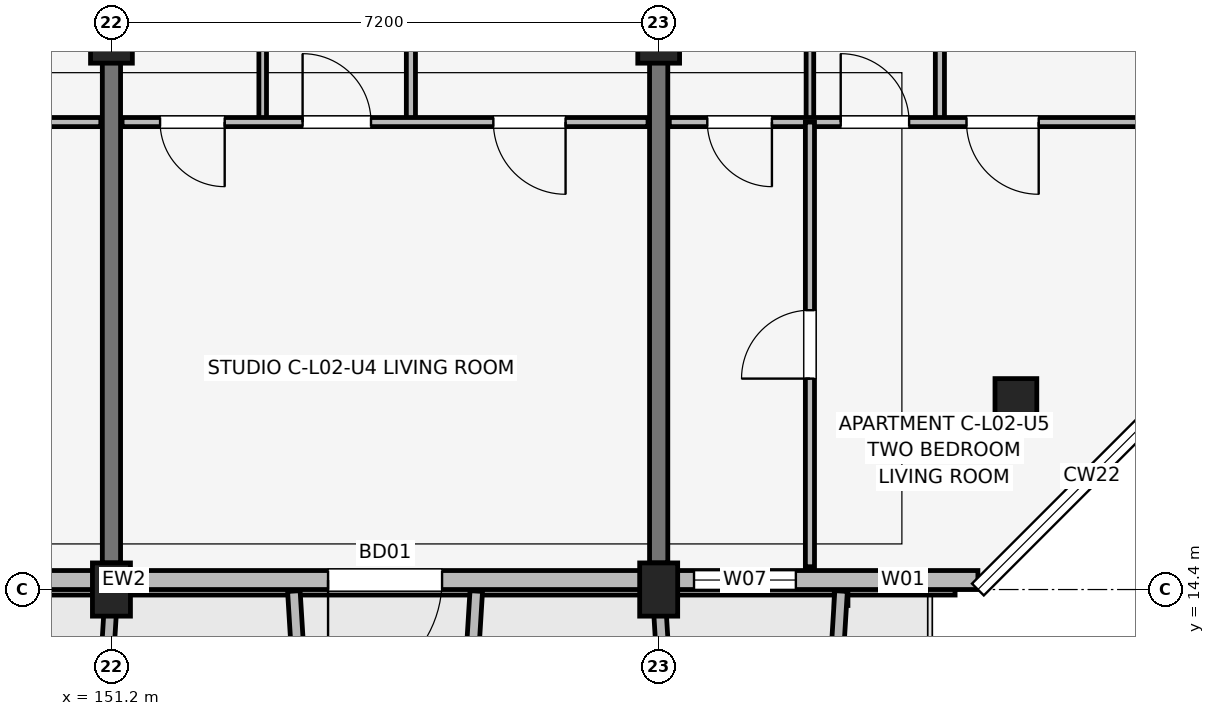
"""IFC4 building model, lengths in metres.
Left out: names, types, materials, properties, quantities, classifications, styles, units other than length and angle.
Written with IfcOpenShell. Run it as: python <this file> out.ifc"""

import sys

from ifc_helpers import new_model, si_unit, direction, frame, frame_2d, origin, origin_2d, place, context, subcontext, project, spatial, rectangle, extrude, element, fill, save


model = new_model("IFC4")
c1 = context("Model", 3, precision=1e-05, world=origin(), true_north=direction((0.0, 1.0)))
c2 = subcontext(c1, "Body", "Model", "MODEL_VIEW")
j1 = project(units=[si_unit("LENGTHUNIT", "METRE"), si_unit("PLANEANGLEUNIT", "RADIAN")], contexts=[c1])
p1 = place(None, origin())
s1 = spatial("IfcSite", under=j1, at=p1, CompositionType="ELEMENT")
p2 = place(p1, origin())
s2 = spatial("IfcBuilding", under=s1, at=p2, CompositionType="ELEMENT")
p3 = place(p2, frame((0.0, 0.0, 8.7)))
s3 = spatial("IfcBuildingStorey", under=s2, at=p3, CompositionType="ELEMENT", Elevation=8.7)
p4 = place(p3, frame((151.2, 14.4, 0.0), z_axis=(0.0, 0.0, 1.0), x_axis=(1.0, 0.0, 0.0)))
e1 = element("IfcColumn", 1, at=p4, inside=s3, PredefinedType="COLUMN", context=c2, shape_type="SweptSolid", body=[
    extrude(rectangle(XDim=0.5, YDim=0.7, at=origin_2d()), origin(), (0.0, 0.0, 1.0), 3.15),
])
p5 = place(p3, frame((151.2, 21.6, 0.0), z_axis=(0.0, 0.0, 1.0), x_axis=(1.0, 0.0, 0.0)))
e2 = element("IfcColumn", 2, at=p5, inside=s3, PredefinedType="COLUMN", context=c2, shape_type="SweptSolid", body=[
    extrude(rectangle(XDim=0.55, YDim=0.55, at=origin_2d()), origin(), (0.0, 0.0, 1.0), 3.15),
])
p6 = place(p3, frame((158.4, 14.4, 0.0), z_axis=(0.0, 0.0, 1.0), x_axis=(1.0, 0.0, 0.0)))
e3 = element("IfcColumn", 3, at=p6, inside=s3, PredefinedType="COLUMN", context=c2, shape_type="SweptSolid", body=[
    extrude(rectangle(XDim=0.5, YDim=0.7, at=origin_2d()), origin(), (0.0, 0.0, 1.0), 3.15),
])
for number, where, z_axis, x_axis in (
    (4, (158.4, 21.6, 0.0), (0.0, 0.0, 1.0), (1.0, 0.0, 0.0)),
    (5, (163.1, 16.9, 0.0), (0.0, 0.0, 1.0), (1.0, 0.0, 0.0)),
):
    element("IfcColumn", number, at=place(p3, frame(where, z_axis=z_axis, x_axis=x_axis)), inside=s3, PredefinedType="COLUMN", context=c2, shape_type="SweptSolid", body=[
        extrude(rectangle(XDim=0.55, YDim=0.55, at=origin_2d()), origin(), (0.0, 0.0, 1.0), 3.15),
    ])
for number, where, z_axis, x_axis in (
    (6, (151.2, 14.75, 0.0), (0.0, 0.0, 1.0), (0.0, 1.0, 0.0)),
    (7, (158.4, 14.75, 0.0), (0.0, 0.0, 1.0), (0.0, 1.0, 0.0)),
):
    element("IfcWall", number, at=place(p3, frame(where, z_axis=z_axis, x_axis=x_axis)), inside=s3, PredefinedType="SHEAR", context=c2, shape_type="SweptSolid", body=[
        extrude(rectangle(XDim=9.4, YDim=0.24, at=frame_2d((4.7, 0.0))), origin(), (0.0, 0.0, 1.0), 3.15),
    ])
p7 = place(p3, frame((132.6, 14.525, 0.0), z_axis=(0.0, 0.0, 1.0), x_axis=(1.0, 0.0, 0.0)))
e8 = element("IfcWall", 8, at=p7, inside=s3, PredefinedType="SOLIDWALL", context=c2, shape_type="SweptSolid", body=[
    extrude(rectangle(XDim=30.0, YDim=0.25, at=frame_2d((15.0, 0.0))), origin(), (0.0, 0.0, 1.0), 2.43),
])
p8 = place(p7, frame((8.625, 0.0, 0.0), z_axis=(0.0, 0.0, 1.0), x_axis=(-1.0, 0.0, 0.0)))
e9 = element("IfcOpeningElement", 9, at=p8, cuts=e8, PredefinedType="OPENING", context=c2, shape_type="SweptSolid", body=[
    extrude(rectangle(XDim=1.65, YDim=2.15, at=frame_2d((0.825, 1.075))), frame((0.0, 0.135, 0.0), z_axis=(0.0, -1.0, 0.0), x_axis=(1.0, 0.0, 0.0)), (0.0, 0.0, 1.0), 0.27),
])
p9 = place(p7, frame((22.95, 0.0, 0.0), z_axis=(0.0, 0.0, 1.0), x_axis=(-1.0, 0.0, 0.0)))
e10 = element("IfcOpeningElement", 10, at=p9, cuts=e8, PredefinedType="OPENING", context=c2, shape_type="SweptSolid", body=[
    extrude(rectangle(XDim=1.5, YDim=2.15, at=frame_2d((0.75, 1.075))), frame((0.0, 0.135, 0.0), z_axis=(0.0, -1.0, 0.0), x_axis=(1.0, 0.0, 0.0)), (0.0, 0.0, 1.0), 0.27),
])
p10 = place(p7, frame((1.925, 0.0, 0.7)))
e11 = element("IfcOpeningElement", 11, at=p10, cuts=e8, PredefinedType="OPENING", context=c2, shape_type="SweptSolid", body=[
    extrude(rectangle(XDim=1.86, YDim=1.6, at=frame_2d((0.93, 0.8))), frame((0.0, 0.135, 0.0), z_axis=(0.0, -1.0, 0.0), x_axis=(1.0, 0.0, 0.0)), (0.0, 0.0, 1.0), 0.27),
])
p11 = place(p7, frame((4.85, 0.0, 0.75)))
e12 = element("IfcOpeningElement", 12, at=p11, cuts=e8, PredefinedType="OPENING", context=c2, shape_type="SweptSolid", body=[
    extrude(rectangle(XDim=1.22, YDim=1.5, at=frame_2d((0.61, 0.75))), frame((0.0, 0.135, 0.0), z_axis=(0.0, -1.0, 0.0), x_axis=(1.0, 0.0, 0.0)), (0.0, 0.0, 1.0), 0.27),
])
p12 = place(p7, frame((13.925, 0.0, 0.67)))
e13 = element("IfcOpeningElement", 13, at=p12, cuts=e8, PredefinedType="OPENING", context=c2, shape_type="SweptSolid", body=[
    extrude(rectangle(XDim=2.15, YDim=1.65, at=frame_2d((1.075, 0.825))), frame((0.0, 0.135, 0.0), z_axis=(0.0, -1.0, 0.0), x_axis=(1.0, 0.0, 0.0)), (0.0, 0.0, 1.0), 0.27),
])
p13 = place(p7, frame((26.265, 0.0, 0.75)))
e14 = element("IfcOpeningElement", 14, at=p13, cuts=e8, PredefinedType="OPENING", context=c2, shape_type="SweptSolid", body=[
    extrude(rectangle(XDim=1.34, YDim=1.55, at=frame_2d((0.67, 0.775))), frame((0.0, 0.135, 0.0), z_axis=(0.0, -1.0, 0.0), x_axis=(1.0, 0.0, 0.0)), (0.0, 0.0, 1.0), 0.27),
])
p14 = place(p7, frame((28.715, 0.0, 0.75)))
e15 = element("IfcOpeningElement", 15, at=p14, cuts=e8, PredefinedType="OPENING", context=c2, shape_type="SweptSolid", body=[
    extrude(rectangle(XDim=0.6, YDim=1.25, at=frame_2d((0.3, 0.625))), frame((0.0, 0.135, 0.0), z_axis=(0.0, -1.0, 0.0), x_axis=(1.0, 0.0, 0.0)), (0.0, 0.0, 1.0), 0.27),
])
p15 = place(p3, frame((151.2, 14.38, 0.0), z_axis=(0.0, 0.0, 1.0), x_axis=(-0.061046865508, -0.998134900808, 0.0)))
e16 = element("IfcWall", 16, at=p15, inside=s3, PredefinedType="ELEMENTEDWALL", context=c2, shape_type="SweptSolid", body=[
    extrude(rectangle(XDim=1.964, YDim=0.165, at=frame_2d((0.982, 0.0))), origin(), (0.0, 0.0, 1.0), 2.95),
])
for number, where, z_axis, x_axis in (
    (17, (153.6, 14.38, 0.0), (0.0, 0.0, 1.0), (0.061, -0.998, 0.0)),
    (18, (156.0, 14.38, 0.0), (0.0, 0.0, 1.0), (-0.061, -0.998, 0.0)),
):
    element("IfcWall", number, at=place(p3, frame(where, z_axis=z_axis, x_axis=x_axis)), inside=s3, PredefinedType="ELEMENTEDWALL", context=c2, shape_type="SweptSolid", body=[
        extrude(rectangle(XDim=1.964, YDim=0.165, at=frame_2d((0.982, 0.0))), origin(), (0.0, 0.0, 1.0), 2.55),
    ])
for number, where, z_axis, x_axis in (
    (19, (158.4, 14.38, 0.0), (0.0, 0.0, 1.0), (0.061, -0.998, 0.0)),
    (20, (160.8, 14.38, 0.0), (0.0, 0.0, 1.0), (-0.061, -0.998, 0.0)),
):
    element("IfcWall", number, at=place(p3, frame(where, z_axis=z_axis, x_axis=x_axis)), inside=s3, PredefinedType="ELEMENTEDWALL", context=c2, shape_type="SweptSolid", body=[
        extrude(rectangle(XDim=1.964, YDim=0.165, at=frame_2d((0.982, 0.0))), origin(), (0.0, 0.0, 1.0), 2.95),
    ])
p16 = place(p3, frame((144.14, 20.55, 0.0), z_axis=(0.0, 0.0, 1.0), x_axis=(1.0, 0.0, 0.0)))
e21 = element("IfcWall", 21, at=p16, inside=s3, PredefinedType="PARTITIONING", context=c2, shape_type="SweptSolid", body=[
    extrude(rectangle(XDim=6.92, YDim=0.12, at=frame_2d((3.46, 0.0))), origin(), (0.0, 0.0, 1.0), 2.38),
])
p17 = place(p16, frame((1.475, 0.0, 0.0), z_axis=(0.0, 0.0, 1.0), x_axis=(-1.0, 0.0, 0.0)))
e22 = element("IfcOpeningElement", 22, at=p17, cuts=e21, PredefinedType="OPENING", context=c2, shape_type="SweptSolid", body=[
    extrude(rectangle(XDim=0.85, YDim=2.08, at=frame_2d((0.425, 1.04))), frame((0.0, 0.07, 0.0), z_axis=(0.0, -1.0, 0.0), x_axis=(1.0, 0.0, 0.0)), (0.0, 0.0, 1.0), 0.14),
])
p18 = place(p16, frame((2.625, 0.0, 0.0)))
e23 = element("IfcOpeningElement", 23, at=p18, cuts=e21, PredefinedType="OPENING", context=c2, shape_type="SweptSolid", body=[
    extrude(rectangle(XDim=0.9, YDim=2.08, at=frame_2d((0.45, 1.04))), frame((0.0, 0.07, 0.0), z_axis=(0.0, -1.0, 0.0), x_axis=(1.0, 0.0, 0.0)), (0.0, 0.0, 1.0), 0.14),
])
p19 = place(p16, frame((5.96, 0.0, 0.0), z_axis=(0.0, 0.0, 1.0), x_axis=(-1.0, 0.0, 0.0)))
e24 = element("IfcOpeningElement", 24, at=p19, cuts=e21, PredefinedType="OPENING", context=c2, shape_type="SweptSolid", body=[
    extrude(rectangle(XDim=0.95, YDim=2.08, at=frame_2d((0.475, 1.04))), frame((0.0, 0.07, 0.0), z_axis=(0.0, -1.0, 0.0), x_axis=(1.0, 0.0, 0.0)), (0.0, 0.0, 1.0), 0.14),
])
p20 = place(p3, frame((153.19, 20.55, 0.0), z_axis=(0.0, 0.0, 1.0), x_axis=(0.0, 1.0, 0.0)))
e25 = element("IfcWall", 25, at=p20, inside=s3, PredefinedType="PARTITIONING", context=c2, shape_type="SweptSolid", body=[
    extrude(rectangle(XDim=3.75, YDim=0.1, at=frame_2d((1.875, 0.0))), origin(), (0.0, 0.0, 1.0), 2.375),
])
p21 = place(p3, frame((155.14, 20.55, 0.0), z_axis=(0.0, 0.0, 1.0), x_axis=(0.0, 1.0, 0.0)))
e26 = element("IfcWall", 26, at=p21, inside=s3, PredefinedType="PARTITIONING", context=c2, shape_type="SweptSolid", body=[
    extrude(rectangle(XDim=3.75, YDim=0.12, at=frame_2d((1.875, 0.0))), origin(), (0.0, 0.0, 1.0), 2.375),
])
p22 = place(p3, frame((151.34, 20.55, 0.0), z_axis=(0.0, 0.0, 1.0), x_axis=(1.0, 0.0, 0.0)))
e27 = element("IfcWall", 27, at=p22, inside=s3, PredefinedType="PARTITIONING", context=c2, shape_type="SweptSolid", body=[
    extrude(rectangle(XDim=6.92, YDim=0.12, at=frame_2d((3.46, 0.0))), origin(), (0.0, 0.0, 1.0), 2.38),
])
p23 = place(p22, frame((1.35, 0.0, 0.0), z_axis=(0.0, 0.0, 1.0), x_axis=(-1.0, 0.0, 0.0)))
e28 = element("IfcOpeningElement", 28, at=p23, cuts=e27, PredefinedType="OPENING", context=c2, shape_type="SweptSolid", body=[
    extrude(rectangle(XDim=0.85, YDim=2.08, at=frame_2d((0.425, 1.04))), frame((0.0, 0.07, 0.0), z_axis=(0.0, -1.0, 0.0), x_axis=(1.0, 0.0, 0.0)), (0.0, 0.0, 1.0), 0.14),
])
p24 = place(p22, frame((2.375, 0.0, 0.0)))
e29 = element("IfcOpeningElement", 29, at=p24, cuts=e27, PredefinedType="OPENING", context=c2, shape_type="SweptSolid", body=[
    extrude(rectangle(XDim=0.9, YDim=2.08, at=frame_2d((0.45, 1.04))), frame((0.0, 0.07, 0.0), z_axis=(0.0, -1.0, 0.0), x_axis=(1.0, 0.0, 0.0)), (0.0, 0.0, 1.0), 0.14),
])
p25 = place(p22, frame((5.835, 0.0, 0.0), z_axis=(0.0, 0.0, 1.0), x_axis=(-1.0, 0.0, 0.0)))
e30 = element("IfcOpeningElement", 30, at=p25, cuts=e27, PredefinedType="OPENING", context=c2, shape_type="SweptSolid", body=[
    extrude(rectangle(XDim=0.95, YDim=2.08, at=frame_2d((0.475, 1.04))), frame((0.0, 0.07, 0.0), z_axis=(0.0, -1.0, 0.0), x_axis=(1.0, 0.0, 0.0)), (0.0, 0.0, 1.0), 0.14),
])
p26 = place(p3, frame((160.39, 20.55, 0.0), z_axis=(0.0, 0.0, 1.0), x_axis=(0.0, 1.0, 0.0)))
e31 = element("IfcWall", 31, at=p26, inside=s3, PredefinedType="PARTITIONING", context=c2, shape_type="SweptSolid", body=[
    extrude(rectangle(XDim=3.75, YDim=0.1, at=frame_2d((1.875, 0.0))), origin(), (0.0, 0.0, 1.0), 2.375),
])
p27 = place(p3, frame((162.1, 20.55, 0.0), z_axis=(0.0, 0.0, 1.0), x_axis=(0.0, 1.0, 0.0)))
e32 = element("IfcWall", 32, at=p27, inside=s3, PredefinedType="PARTITIONING", context=c2, shape_type="SweptSolid", body=[
    extrude(rectangle(XDim=3.75, YDim=0.12, at=frame_2d((1.875, 0.0))), origin(), (0.0, 0.0, 1.0), 2.375),
])
p28 = place(p3, frame((158.54, 20.55, 0.0), z_axis=(0.0, 0.0, 1.0), x_axis=(1.0, 0.0, 0.0)))
e33 = element("IfcWall", 33, at=p28, inside=s3, PredefinedType="PARTITIONING", context=c2, shape_type="SweptSolid", body=[
    extrude(rectangle(XDim=6.92, YDim=0.12, at=frame_2d((3.46, 0.0))), origin(), (0.0, 0.0, 1.0), 2.38),
])
p29 = place(p28, frame((1.35, 0.0, 0.0), z_axis=(0.0, 0.0, 1.0), x_axis=(-1.0, 0.0, 0.0)))
e34 = element("IfcOpeningElement", 34, at=p29, cuts=e33, PredefinedType="OPENING", context=c2, shape_type="SweptSolid", body=[
    extrude(rectangle(XDim=0.85, YDim=2.08, at=frame_2d((0.425, 1.04))), frame((0.0, 0.07, 0.0), z_axis=(0.0, -1.0, 0.0), x_axis=(1.0, 0.0, 0.0)), (0.0, 0.0, 1.0), 0.14),
])
p30 = place(p28, frame((2.255, 0.0, 0.0)))
e35 = element("IfcOpeningElement", 35, at=p30, cuts=e33, PredefinedType="OPENING", context=c2, shape_type="SweptSolid", body=[
    extrude(rectangle(XDim=0.9, YDim=2.08, at=frame_2d((0.45, 1.04))), frame((0.0, 0.07, 0.0), z_axis=(0.0, -1.0, 0.0), x_axis=(1.0, 0.0, 0.0)), (0.0, 0.0, 1.0), 0.14),
])
p31 = place(p28, frame((4.86, 0.0, 0.0), z_axis=(0.0, 0.0, 1.0), x_axis=(-1.0, 0.0, 0.0)))
e36 = element("IfcOpeningElement", 36, at=p31, cuts=e33, PredefinedType="OPENING", context=c2, shape_type="SweptSolid", body=[
    extrude(rectangle(XDim=0.95, YDim=2.08, at=frame_2d((0.475, 1.04))), frame((0.0, 0.07, 0.0), z_axis=(0.0, -1.0, 0.0), x_axis=(1.0, 0.0, 0.0)), (0.0, 0.0, 1.0), 0.14),
])
p32 = place(p3, frame((160.39, 14.7, 0.0), z_axis=(0.0, 0.0, 1.0), x_axis=(0.0, 1.0, 0.0)))
e37 = element("IfcWall", 37, at=p32, inside=s3, PredefinedType="PARTITIONING", context=c2, shape_type="SweptSolid", body=[
    extrude(rectangle(XDim=5.85, YDim=0.12, at=frame_2d((2.925, 0.0))), origin(), (0.0, 0.0, 1.0), 2.38),
])
p33 = place(p32, frame((2.475, 0.0, 0.0)))
e38 = element("IfcOpeningElement", 38, at=p33, cuts=e37, PredefinedType="OPENING", context=c2, shape_type="SweptSolid", body=[
    extrude(rectangle(XDim=0.9, YDim=2.08, at=frame_2d((0.45, 1.04))), frame((0.0, 0.07, 0.0), z_axis=(0.0, -1.0, 0.0), x_axis=(1.0, 0.0, 0.0)), (0.0, 0.0, 1.0), 0.14),
])
p34 = place(p9, origin())
e39 = element("IfcDoor", 39, at=p34, inside=s3, OperationType="SINGLE_SWING_LEFT", PredefinedType="DOOR", context=c2, shape_type="SweptSolid", body=[
    extrude(rectangle(XDim=1.5, YDim=2.15, at=frame_2d((0.75, 1.075))), frame((0.0, 0.025, 0.0), z_axis=(0.0, -1.0, 0.0), x_axis=(1.0, 0.0, 0.0)), (0.0, 0.0, 1.0), 0.05),
])
fill(e10, e39)
p35 = place(p13, origin())
e40 = element("IfcWindow", 40, at=p35, inside=s3, PartitioningType="SINGLE_PANEL", PredefinedType="WINDOW", context=c2, shape_type="SweptSolid", body=[
    extrude(rectangle(XDim=1.34, YDim=1.55, at=frame_2d((0.67, 0.775))), frame((0.0, 0.03, 0.0), z_axis=(0.0, -1.0, 0.0), x_axis=(1.0, 0.0, 0.0)), (0.0, 0.0, 1.0), 0.06),
])
fill(e14, e40)
p36 = place(p14, origin())
e41 = element("IfcWindow", 41, at=p36, inside=s3, PartitioningType="SINGLE_PANEL", PredefinedType="WINDOW", context=c2, shape_type="SweptSolid", body=[
    extrude(rectangle(XDim=0.6, YDim=1.25, at=frame_2d((0.3, 0.625))), frame((0.0, 0.03, 0.0), z_axis=(0.0, -1.0, 0.0), x_axis=(1.0, 0.0, 0.0)), (0.0, 0.0, 1.0), 0.06),
])
fill(e15, e41)
p37 = place(p23, origin())
e42 = element("IfcDoor", 42, at=p37, inside=s3, OperationType="SINGLE_SWING_RIGHT", PredefinedType="DOOR", context=c2, shape_type="SweptSolid", body=[
    extrude(rectangle(XDim=0.85, YDim=2.08, at=frame_2d((0.425, 1.04))), frame((0.0, 0.025, 0.0), z_axis=(0.0, -1.0, 0.0), x_axis=(1.0, 0.0, 0.0)), (0.0, 0.0, 1.0), 0.05),
])
fill(e28, e42)
p38 = place(p24, origin())
e43 = element("IfcDoor", 43, at=p38, inside=s3, OperationType="SINGLE_SWING_LEFT", PredefinedType="DOOR", context=c2, shape_type="SweptSolid", body=[
    extrude(rectangle(XDim=0.9, YDim=2.08, at=frame_2d((0.45, 1.04))), frame((0.0, 0.025, 0.0), z_axis=(0.0, -1.0, 0.0), x_axis=(1.0, 0.0, 0.0)), (0.0, 0.0, 1.0), 0.05),
])
fill(e29, e43)
p39 = place(p25, origin())
e44 = element("IfcDoor", 44, at=p39, inside=s3, OperationType="SINGLE_SWING_RIGHT", PredefinedType="DOOR", context=c2, shape_type="SweptSolid", body=[
    extrude(rectangle(XDim=0.95, YDim=2.08, at=frame_2d((0.475, 1.04))), frame((0.0, 0.025, 0.0), z_axis=(0.0, -1.0, 0.0), x_axis=(1.0, 0.0, 0.0)), (0.0, 0.0, 1.0), 0.05),
])
fill(e30, e44)
p40 = place(p29, origin())
e45 = element("IfcDoor", 45, at=p40, inside=s3, OperationType="SINGLE_SWING_RIGHT", PredefinedType="DOOR", context=c2, shape_type="SweptSolid", body=[
    extrude(rectangle(XDim=0.85, YDim=2.08, at=frame_2d((0.425, 1.04))), frame((0.0, 0.025, 0.0), z_axis=(0.0, -1.0, 0.0), x_axis=(1.0, 0.0, 0.0)), (0.0, 0.0, 1.0), 0.05),
])
fill(e34, e45)
p41 = place(p30, origin())
e46 = element("IfcDoor", 46, at=p41, inside=s3, OperationType="SINGLE_SWING_LEFT", PredefinedType="DOOR", context=c2, shape_type="SweptSolid", body=[
    extrude(rectangle(XDim=0.9, YDim=2.08, at=frame_2d((0.45, 1.04))), frame((0.0, 0.025, 0.0), z_axis=(0.0, -1.0, 0.0), x_axis=(1.0, 0.0, 0.0)), (0.0, 0.0, 1.0), 0.05),
])
fill(e35, e46)
p42 = place(p31, origin())
e47 = element("IfcDoor", 47, at=p42, inside=s3, OperationType="SINGLE_SWING_RIGHT", PredefinedType="DOOR", context=c2, shape_type="SweptSolid", body=[
    extrude(rectangle(XDim=0.95, YDim=2.08, at=frame_2d((0.475, 1.04))), frame((0.0, 0.025, 0.0), z_axis=(0.0, -1.0, 0.0), x_axis=(1.0, 0.0, 0.0)), (0.0, 0.0, 1.0), 0.05),
])
fill(e36, e47)
p43 = place(p33, origin())
e48 = element("IfcDoor", 48, at=p43, inside=s3, OperationType="SINGLE_SWING_LEFT", PredefinedType="DOOR", context=c2, shape_type="SweptSolid", body=[
    extrude(rectangle(XDim=0.9, YDim=2.08, at=frame_2d((0.45, 1.04))), frame((0.0, 0.025, 0.0), z_axis=(0.0, -1.0, 0.0), x_axis=(1.0, 0.0, 0.0)), (0.0, 0.0, 1.0), 0.05),
])
fill(e38, e48)
save(model, sys.argv[1])
